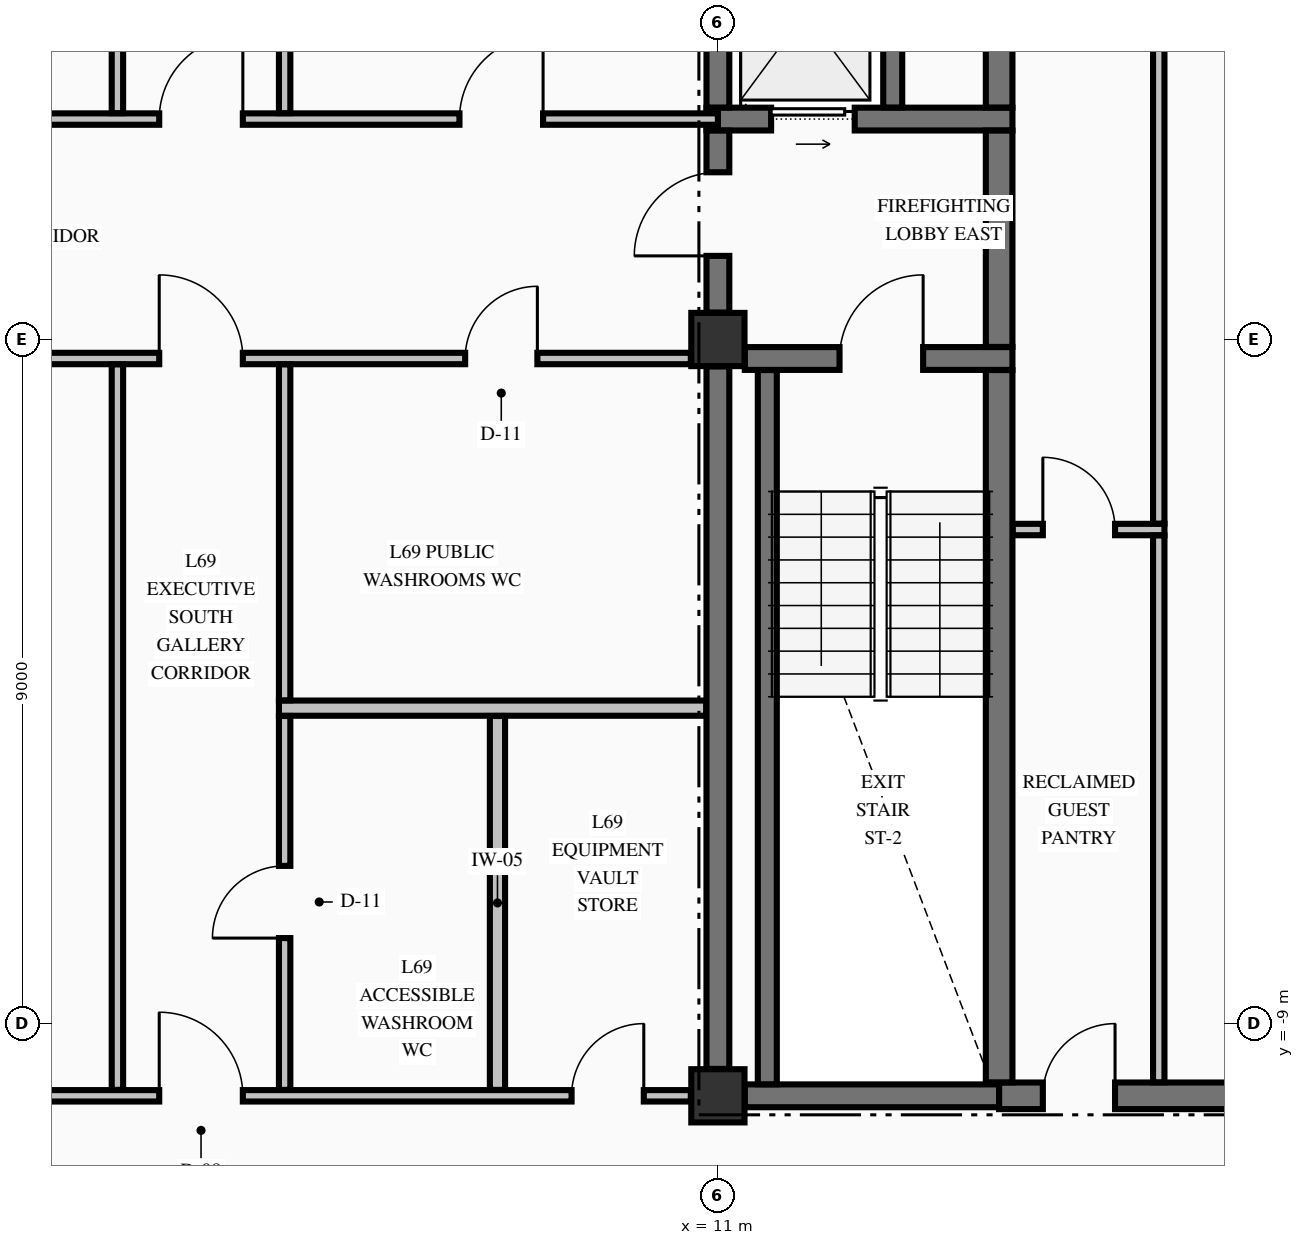
"""IFC4 building model, lengths in metres.
Left out: names, types, materials, properties, quantities, classifications, styles, units other than length and angle.
Written with IfcOpenShell. Run it as: python <this file> out.ifc"""

import sys

from ifc_helpers import new_model, si_unit, direction, frame, frame_2d, origin, origin_2d, place, context, subcontext, project, spatial, rectangle, extrude, element, fill, save


model = new_model("IFC4")
c1 = context("Model", 3, precision=1e-05, world=origin(), true_north=direction((0.0, 1.0)))
c2 = subcontext(c1, "Body", "Model", "MODEL_VIEW")
j1 = project(units=[si_unit("LENGTHUNIT", "METRE"), si_unit("PLANEANGLEUNIT", "RADIAN")], contexts=[c1])
p1 = place(None, origin())
s1 = spatial("IfcSite", under=j1, at=p1, CompositionType="ELEMENT")
p2 = place(p1, origin())
s2 = spatial("IfcBuilding", under=s1, at=p2, CompositionType="ELEMENT")
p3 = place(p2, frame((0.0, 0.0, 260.89)))
s3 = spatial("IfcBuildingStorey", under=s2, at=p3, CompositionType="ELEMENT", Elevation=260.89)
for number, where, z_axis, x_axis in (
    (1, (11.0, -9.95, -0.25), (0.0, 0.0, 1.0), (1.0, 0.0, 0.0)),
    (2, (11.0, 0.0, -0.25), (0.0, 0.0, 1.0), (1.0, 0.0, 0.0)),
):
    element("IfcColumn", number, at=place(p3, frame(where, z_axis=z_axis, x_axis=x_axis)), inside=s3, PredefinedType="COLUMN", context=c2, shape_type="SweptSolid", body=[
        extrude(rectangle(XDim=0.7, YDim=0.7, at=origin_2d()), origin(), (0.0, 0.0, 1.0), 3.23),
    ])
p4 = place(p3, frame((11.354, -9.95, 0.0), z_axis=(0.0, 0.0, 1.0), x_axis=(1.0, 0.0, 0.0)))
e3 = element("IfcWall", 3, at=p4, inside=s3, PredefinedType="SHEAR", context=c2, shape_type="SweptSolid", body=[
    extrude(rectangle(XDim=3.346, YDim=0.3, at=frame_2d((1.673, 0.0))), origin(), (0.0, 0.0, 1.0), 2.98),
])
p5 = place(p3, frame((14.7, -9.95, 0.0), z_axis=(0.0, 0.0, 1.0), x_axis=(1.0, 0.0, 0.0)))
e4 = element("IfcWall", 4, at=p5, inside=s3, PredefinedType="SHEAR", context=c2, shape_type="SweptSolid", body=[
    extrude(rectangle(XDim=4.946, YDim=0.35, at=frame_2d((2.473, 0.0))), origin(), (0.0, 0.0, 1.0), 2.98),
])
p6 = place(p5, frame((3.25, 0.0, 0.0)))
e5 = element("IfcOpeningElement", 5, at=p6, cuts=e4, PredefinedType="OPENING", context=c2, shape_type="SweptSolid", body=[
    extrude(rectangle(XDim=0.9, YDim=2.15, at=frame_2d((0.45, 1.075))), frame((0.0, 0.185, 0.0), z_axis=(0.0, -1.0, 0.0), x_axis=(1.0, 0.0, 0.0)), (0.0, 0.0, 1.0), 0.37),
])
p7 = place(p5, frame((0.575, 0.0, 0.0)))
e6 = element("IfcOpeningElement", 6, at=p7, cuts=e4, PredefinedType="OPENING", context=c2, shape_type="SweptSolid", body=[
    extrude(rectangle(XDim=0.95, YDim=2.15, at=frame_2d((0.475, 1.075))), frame((0.0, 0.185, 0.0), z_axis=(0.0, -1.0, 0.0), x_axis=(1.0, 0.0, 0.0)), (0.0, 0.0, 1.0), 0.37),
])
p8 = place(p3, frame((11.354, -0.25, 0.0), z_axis=(0.0, 0.0, 1.0), x_axis=(1.0, 0.0, 0.0)))
e7 = element("IfcWall", 7, at=p8, inside=s3, PredefinedType="SHEAR", context=c2, shape_type="SweptSolid", body=[
    extrude(rectangle(XDim=3.521, YDim=0.3, at=frame_2d((1.76, 0.0))), origin(), (0.0, 0.0, 1.0), 2.98),
])
p9 = place(p8, frame((1.246, 0.0, 0.0)))
e8 = element("IfcOpeningElement", 8, at=p9, cuts=e7, PredefinedType="OPENING", context=c2, shape_type="SweptSolid", body=[
    extrude(rectangle(XDim=1.1, YDim=2.15, at=frame_2d((0.55, 1.075))), frame((0.0, 0.16, 0.0), z_axis=(0.0, -1.0, 0.0), x_axis=(1.0, 0.0, 0.0)), (0.0, 0.0, 1.0), 0.32),
])
p10 = place(p3, frame((10.85, 2.9, 0.0), z_axis=(0.0, 0.0, 1.0), x_axis=(1.0, 0.0, 0.0)))
e9 = element("IfcWall", 9, at=p10, inside=s3, PredefinedType="SHEAR", context=c2, shape_type="SweptSolid", body=[
    extrude(rectangle(XDim=4.025, YDim=0.3, at=frame_2d((2.012, 0.0))), origin(), (0.0, 0.0, 1.0), 2.98),
])
p11 = place(p10, frame((0.85, 0.0, 0.0)))
e10 = element("IfcOpeningElement", 10, at=p11, cuts=e9, PredefinedType="OPENING", context=c2, shape_type="SweptSolid", body=[
    extrude(rectangle(XDim=1.1, YDim=2.2, at=frame_2d((0.55, 1.1))), frame((0.0, 0.16, 0.0), z_axis=(0.0, -1.0, 0.0), x_axis=(1.0, 0.0, 0.0)), (0.0, 0.0, 1.0), 0.32),
])
p12 = place(p3, frame((-10.644, -9.95, 0.0), z_axis=(0.0, 0.0, 1.0), x_axis=(1.0, 0.0, 0.0)))
e11 = element("IfcWall", 11, at=p12, inside=s3, PredefinedType="PARTITIONING", context=c2, shape_type="SweptSolid", body=[
    extrude(rectangle(XDim=21.288, YDim=0.15, at=frame_2d((10.644, 0.0))), origin(), (0.0, 0.0, 1.0), 2.98),
])
p13 = place(p12, frame((14.294, 0.0, 0.0)))
e12 = element("IfcOpeningElement", 12, at=p13, cuts=e11, PredefinedType="OPENING", context=c2, shape_type="SweptSolid", body=[
    extrude(rectangle(XDim=1.1, YDim=2.15, at=frame_2d((0.55, 1.075))), frame((0.0, 0.085, 0.0), z_axis=(0.0, -1.0, 0.0), x_axis=(1.0, 0.0, 0.0)), (0.0, 0.0, 1.0), 0.17),
])
p14 = place(p12, frame((19.719, 0.0, 0.0)))
e13 = element("IfcOpeningElement", 13, at=p14, cuts=e11, PredefinedType="OPENING", context=c2, shape_type="SweptSolid", body=[
    extrude(rectangle(XDim=0.95, YDim=2.15, at=frame_2d((0.475, 1.075))), frame((0.0, 0.085, 0.0), z_axis=(0.0, -1.0, 0.0), x_axis=(1.0, 0.0, 0.0)), (0.0, 0.0, 1.0), 0.17),
])
p15 = place(p3, frame((5.225, -4.85, 0.0), z_axis=(0.0, 0.0, 1.0), x_axis=(1.0, 0.0, 0.0)))
e14 = element("IfcWall", 14, at=p15, inside=s3, PredefinedType="PARTITIONING", context=c2, shape_type="SweptSolid", body=[
    extrude(rectangle(XDim=5.622, YDim=0.2, at=frame_2d((2.811, 0.0))), origin(), (0.0, 0.0, 1.0), 2.98),
])
p16 = place(p3, frame((14.878, -2.5, 0.0), z_axis=(0.0, 0.0, 1.0), x_axis=(1.0, 0.0, 0.0)))
e15 = element("IfcWall", 15, at=p16, inside=s3, PredefinedType="PARTITIONING", context=c2, shape_type="SweptSolid", body=[
    extrude(rectangle(XDim=1.997, YDim=0.15, at=frame_2d((0.999, 0.0))), origin(), (0.0, 0.0, 1.0), 2.98),
])
p17 = place(p16, frame((0.397, 0.0, 0.0)))
e16 = element("IfcOpeningElement", 16, at=p17, cuts=e15, PredefinedType="OPENING", context=c2, shape_type="SweptSolid", body=[
    extrude(rectangle(XDim=0.95, YDim=2.15, at=frame_2d((0.475, 1.075))), frame((0.0, 0.085, 0.0), z_axis=(0.0, -1.0, 0.0), x_axis=(1.0, 0.0, 0.0)), (0.0, 0.0, 1.0), 0.17),
])
p18 = place(p3, frame((-10.644, -0.25, 0.0), z_axis=(0.0, 0.0, 1.0), x_axis=(1.0, 0.0, 0.0)))
e17 = element("IfcWall", 17, at=p18, inside=s3, PredefinedType="PARTITIONING", context=c2, shape_type="SweptSolid", body=[
    extrude(rectangle(XDim=21.288, YDim=0.15, at=frame_2d((10.644, 0.0))), origin(), (0.0, 0.0, 1.0), 2.98),
])
p19 = place(p18, frame((14.294, 0.0, 0.0)))
e18 = element("IfcOpeningElement", 18, at=p19, cuts=e17, PredefinedType="OPENING", context=c2, shape_type="SweptSolid", body=[
    extrude(rectangle(XDim=1.1, YDim=2.15, at=frame_2d((0.55, 1.075))), frame((0.0, 0.085, 0.0), z_axis=(0.0, -1.0, 0.0), x_axis=(1.0, 0.0, 0.0)), (0.0, 0.0, 1.0), 0.17),
])
p20 = place(p18, frame((6.169, 0.0, 0.0)))
e19 = element("IfcOpeningElement", 19, at=p20, cuts=e17, PredefinedType="OPENING", context=c2, shape_type="SweptSolid", body=[
    extrude(rectangle(XDim=1.05, YDim=2.15, at=frame_2d((0.525, 1.075))), frame((0.0, 0.085, 0.0), z_axis=(0.0, -1.0, 0.0), x_axis=(1.0, 0.0, 0.0)), (0.0, 0.0, 1.0), 0.17),
])
p21 = place(p18, frame((18.319, 0.0, 0.0)))
e20 = element("IfcOpeningElement", 20, at=p21, cuts=e17, PredefinedType="OPENING", context=c2, shape_type="SweptSolid", body=[
    extrude(rectangle(XDim=0.95, YDim=2.15, at=frame_2d((0.475, 1.075))), frame((0.0, 0.085, 0.0), z_axis=(0.0, -1.0, 0.0), x_axis=(1.0, 0.0, 0.0)), (0.0, 0.0, 1.0), 0.17),
])
p22 = place(p3, frame((-11.0, 2.9, 0.0), z_axis=(0.0, 0.0, 1.0), x_axis=(1.0, 0.0, 0.0)))
e21 = element("IfcWall", 21, at=p22, inside=s3, PredefinedType="PARTITIONING", context=c2, shape_type="SweptSolid", body=[
    extrude(rectangle(XDim=22.0, YDim=0.15, at=frame_2d((11.0, 0.0))), origin(), (0.0, 0.0, 1.0), 2.98),
])
p23 = place(p22, frame((14.65, 0.0, 0.0)))
e22 = element("IfcOpeningElement", 22, at=p23, cuts=e21, PredefinedType="OPENING", context=c2, shape_type="SweptSolid", body=[
    extrude(rectangle(XDim=1.1, YDim=2.15, at=frame_2d((0.55, 1.075))), frame((0.0, 0.085, 0.0), z_axis=(0.0, -1.0, 0.0), x_axis=(1.0, 0.0, 0.0)), (0.0, 0.0, 1.0), 0.17),
])
p24 = place(p22, frame((6.525, 0.0, 0.0)))
e23 = element("IfcOpeningElement", 23, at=p24, cuts=e21, PredefinedType="OPENING", context=c2, shape_type="SweptSolid", body=[
    extrude(rectangle(XDim=1.05, YDim=2.15, at=frame_2d((0.525, 1.075))), frame((0.0, 0.085, 0.0), z_axis=(0.0, -1.0, 0.0), x_axis=(1.0, 0.0, 0.0)), (0.0, 0.0, 1.0), 0.17),
])
p25 = place(p22, frame((18.6, 0.0, 0.0)))
e24 = element("IfcOpeningElement", 24, at=p25, cuts=e21, PredefinedType="OPENING", context=c2, shape_type="SweptSolid", body=[
    extrude(rectangle(XDim=1.1, YDim=2.15, at=frame_2d((0.55, 1.075))), frame((0.0, 0.085, 0.0), z_axis=(0.0, -1.0, 0.0), x_axis=(1.0, 0.0, 0.0)), (0.0, 0.0, 1.0), 0.17),
])
p26 = place(p3, frame((11.0, -9.596, 0.0), z_axis=(0.0, 0.0, 1.0), x_axis=(0.0, 1.0, 0.0)))
e25 = element("IfcWall", 25, at=p26, inside=s3, PredefinedType="SHEAR", context=c2, shape_type="SweptSolid", body=[
    extrude(rectangle(XDim=9.242, YDim=0.3, at=frame_2d((4.621, 0.0))), origin(), (0.0, 0.0, 1.0), 2.98),
])
p27 = place(p3, frame((11.0, 0.354, 0.0), z_axis=(0.0, 0.0, 1.0), x_axis=(0.0, 1.0, 0.0)))
e26 = element("IfcWall", 26, at=p27, inside=s3, PredefinedType="SHEAR", context=c2, shape_type="SweptSolid", body=[
    extrude(rectangle(XDim=2.394, YDim=0.3, at=frame_2d((1.197, 0.0))), origin(), (0.0, 0.0, 1.0), 2.98),
])
p28 = place(p27, frame((0.746, 0.0, 0.0)))
e27 = element("IfcOpeningElement", 27, at=p28, cuts=e26, PredefinedType="OPENING", context=c2, shape_type="SweptSolid", body=[
    extrude(rectangle(XDim=1.1, YDim=2.15, at=frame_2d((0.55, 1.075))), frame((0.0, 0.16, 0.0), z_axis=(0.0, -1.0, 0.0), x_axis=(1.0, 0.0, 0.0)), (0.0, 0.0, 1.0), 0.32),
])
p29 = place(p3, frame((11.0, 3.052, 0.0), z_axis=(0.0, 0.0, 1.0), x_axis=(0.0, 1.0, 0.0)))
e28 = element("IfcWall", 28, at=p29, inside=s3, PredefinedType="SHEAR", context=c2, shape_type="SweptSolid", body=[
    extrude(rectangle(XDim=2.496, YDim=0.3, at=frame_2d((1.248, 0.0))), origin(), (0.0, 0.0, 1.0), 2.98),
])
p30 = place(p3, frame((11.65, -9.798, 0.0), z_axis=(0.0, 0.0, 1.0), x_axis=(0.0, 1.0, 0.0)))
e29 = element("IfcWall", 29, at=p30, inside=s3, PredefinedType="SOLIDWALL", context=c2, shape_type="SweptSolid", body=[
    extrude(rectangle(XDim=9.396, YDim=0.25, at=frame_2d((4.698, 0.0))), origin(), (0.0, 0.0, 1.0), 2.98),
])
p31 = place(p3, frame((13.3, 3.052, 0.0), z_axis=(0.0, 0.0, 1.0), x_axis=(0.0, 1.0, 0.0)))
e30 = element("IfcWall", 30, at=p31, inside=s3, PredefinedType="SOLIDWALL", context=c2, shape_type="SweptSolid", body=[
    extrude(rectangle(XDim=2.496, YDim=0.25, at=frame_2d((1.248, 0.0))), origin(), (0.0, 0.0, 1.0), 2.98),
])
p32 = place(p3, frame((14.7, -9.773, 0.0), z_axis=(0.0, 0.0, 1.0), x_axis=(0.0, 1.0, 0.0)))
e31 = element("IfcWall", 31, at=p32, inside=s3, PredefinedType="SHEAR", context=c2, shape_type="SweptSolid", body=[
    extrude(rectangle(XDim=9.371, YDim=0.35, at=frame_2d((4.686, 0.0))), origin(), (0.0, 0.0, 1.0), 2.98),
])
p33 = place(p3, frame((14.7, -0.098, 0.0), z_axis=(0.0, 0.0, 1.0), x_axis=(0.0, 1.0, 0.0)))
e32 = element("IfcWall", 32, at=p33, inside=s3, PredefinedType="SHEAR", context=c2, shape_type="SweptSolid", body=[
    extrude(rectangle(XDim=2.846, YDim=0.35, at=frame_2d((1.423, 0.0))), origin(), (0.0, 0.0, 1.0), 2.98),
])
p34 = place(p3, frame((14.7, 3.052, 0.0), z_axis=(0.0, 0.0, 1.0), x_axis=(0.0, 1.0, 0.0)))
e33 = element("IfcWall", 33, at=p34, inside=s3, PredefinedType="SHEAR", context=c2, shape_type="SweptSolid", body=[
    extrude(rectangle(XDim=2.496, YDim=0.35, at=frame_2d((1.248, 0.0))), origin(), (0.0, 0.0, 1.0), 2.98),
])
p35 = place(p3, frame((3.1, -9.872, 0.0), z_axis=(0.0, 0.0, 1.0), x_axis=(0.0, 1.0, 0.0)))
e34 = element("IfcWall", 34, at=p35, inside=s3, PredefinedType="PARTITIONING", context=c2, shape_type="SweptSolid", body=[
    extrude(rectangle(XDim=9.544, YDim=0.15, at=frame_2d((4.772, 0.0))), origin(), (0.0, 0.0, 1.0), 2.98),
])
p36 = place(p3, frame((3.1, 2.978, 0.0), z_axis=(0.0, 0.0, 1.0), x_axis=(0.0, 1.0, 0.0)))
e35 = element("IfcWall", 35, at=p36, inside=s3, PredefinedType="PARTITIONING", context=c2, shape_type="SweptSolid", body=[
    extrude(rectangle(XDim=7.444, YDim=0.15, at=frame_2d((3.722, 0.0))), origin(), (0.0, 0.0, 1.0), 2.98),
])
p37 = place(p3, frame((5.3, -9.872, 0.0), z_axis=(0.0, 0.0, 1.0), x_axis=(0.0, 1.0, 0.0)))
e36 = element("IfcWall", 36, at=p37, inside=s3, PredefinedType="PARTITIONING", context=c2, shape_type="SweptSolid", body=[
    extrude(rectangle(XDim=4.919, YDim=0.15, at=frame_2d((2.459, 0.0))), origin(), (0.0, 0.0, 1.0), 2.98),
])
p38 = place(p37, frame((1.997, 0.0, 0.0)))
e37 = element("IfcOpeningElement", 37, at=p38, cuts=e36, PredefinedType="OPENING", context=c2, shape_type="SweptSolid", body=[
    extrude(rectangle(XDim=0.95, YDim=2.15, at=frame_2d((0.475, 1.075))), frame((0.0, 0.085, 0.0), z_axis=(0.0, -1.0, 0.0), x_axis=(1.0, 0.0, 0.0)), (0.0, 0.0, 1.0), 0.17),
])
p39 = place(p3, frame((5.3, -4.747, 0.0), z_axis=(0.0, 0.0, 1.0), x_axis=(0.0, 1.0, 0.0)))
e38 = element("IfcWall", 38, at=p39, inside=s3, PredefinedType="PARTITIONING", context=c2, shape_type="SweptSolid", body=[
    extrude(rectangle(XDim=4.419, YDim=0.15, at=frame_2d((2.209, 0.0))), origin(), (0.0, 0.0, 1.0), 2.98),
])
p40 = place(p3, frame((5.3, 2.978, 0.0), z_axis=(0.0, 0.0, 1.0), x_axis=(0.0, 1.0, 0.0)))
e39 = element("IfcWall", 39, at=p40, inside=s3, PredefinedType="PARTITIONING", context=c2, shape_type="SweptSolid", body=[
    extrude(rectangle(XDim=7.444, YDim=0.15, at=frame_2d((3.722, 0.0))), origin(), (0.0, 0.0, 1.0), 2.98),
])
p41 = place(p3, frame((8.1, -9.872, 0.0), z_axis=(0.0, 0.0, 1.0), x_axis=(0.0, 1.0, 0.0)))
e40 = element("IfcWall", 40, at=p41, inside=s3, PredefinedType="PARTITIONING", context=c2, shape_type="SweptSolid", body=[
    extrude(rectangle(XDim=4.919, YDim=0.2, at=frame_2d((2.459, 0.0))), origin(), (0.0, 0.0, 1.0), 2.98),
])
p42 = place(p3, frame((16.8, -9.772, 0.0), z_axis=(0.0, 0.0, 1.0), x_axis=(0.0, 1.0, 0.0)))
e41 = element("IfcWall", 41, at=p42, inside=s3, PredefinedType="PARTITIONING", context=c2, shape_type="SweptSolid", body=[
    extrude(rectangle(XDim=7.194, YDim=0.15, at=frame_2d((3.597, 0.0))), origin(), (0.0, 0.0, 1.0), 2.98),
])
p43 = place(p3, frame((16.8, -2.422, 0.0), z_axis=(0.0, 0.0, 1.0), x_axis=(0.0, 1.0, 0.0)))
e42 = element("IfcWall", 42, at=p43, inside=s3, PredefinedType="PARTITIONING", context=c2, shape_type="SweptSolid", body=[
    extrude(rectangle(XDim=7.144, YDim=0.15, at=frame_2d((3.572, 0.0))), origin(), (0.0, 0.0, 1.0), 2.98),
])
p44 = place(p9, origin())
e43 = element("IfcDoor", 43, at=p44, inside=s3, OperationType="SINGLE_SWING_RIGHT", PredefinedType="DOOR", context=c2, shape_type="SweptSolid", body=[
    extrude(rectangle(XDim=1.1, YDim=2.15, at=frame_2d((0.55, 1.075))), frame((0.0, 0.025, 0.0), z_axis=(0.0, -1.0, 0.0), x_axis=(1.0, 0.0, 0.0)), (0.0, 0.0, 1.0), 0.05),
])
fill(e8, e43)
p45 = place(p28, origin())
e44 = element("IfcDoor", 44, at=p45, inside=s3, OperationType="SINGLE_SWING_LEFT", PredefinedType="DOOR", context=c2, shape_type="SweptSolid", body=[
    extrude(rectangle(XDim=1.1, YDim=2.15, at=frame_2d((0.55, 1.075))), frame((0.0, 0.025, 0.0), z_axis=(0.0, -1.0, 0.0), x_axis=(1.0, 0.0, 0.0)), (0.0, 0.0, 1.0), 0.05),
])
fill(e27, e44)
p46 = place(p11, origin())
e45 = element("IfcDoor", 45, at=p46, inside=s3, OperationType="SLIDING_TO_RIGHT", PredefinedType="DOOR", context=c2, shape_type="SweptSolid", body=[
    extrude(rectangle(XDim=1.1, YDim=2.2, at=frame_2d((0.55, 1.1))), frame((0.0, 0.025, 0.0), z_axis=(0.0, -1.0, 0.0), x_axis=(1.0, 0.0, 0.0)), (0.0, 0.0, 1.0), 0.05),
])
fill(e10, e45)
p47 = place(p7, origin())
e46 = element("IfcDoor", 46, at=p47, inside=s3, OperationType="SINGLE_SWING_RIGHT", PredefinedType="DOOR", context=c2, shape_type="SweptSolid", body=[
    extrude(rectangle(XDim=0.95, YDim=2.15, at=frame_2d((0.475, 1.075))), frame((0.0, 0.025, 0.0), z_axis=(0.0, -1.0, 0.0), x_axis=(1.0, 0.0, 0.0)), (0.0, 0.0, 1.0), 0.05),
])
fill(e6, e46)
p48 = place(p17, origin())
e47 = element("IfcDoor", 47, at=p48, inside=s3, OperationType="SINGLE_SWING_LEFT", PredefinedType="DOOR", context=c2, shape_type="SweptSolid", body=[
    extrude(rectangle(XDim=0.95, YDim=2.15, at=frame_2d((0.475, 1.075))), frame((0.0, 0.025, 0.0), z_axis=(0.0, -1.0, 0.0), x_axis=(1.0, 0.0, 0.0)), (0.0, 0.0, 1.0), 0.05),
])
fill(e16, e47)
p49 = place(p13, origin())
e48 = element("IfcDoor", 48, at=p49, inside=s3, OperationType="SINGLE_SWING_LEFT", PredefinedType="DOOR", context=c2, shape_type="SweptSolid", body=[
    extrude(rectangle(XDim=1.1, YDim=2.15, at=frame_2d((0.55, 1.075))), frame((0.0, 0.025, 0.0), z_axis=(0.0, -1.0, 0.0), x_axis=(1.0, 0.0, 0.0)), (0.0, 0.0, 1.0), 0.05),
])
fill(e12, e48)
p50 = place(p23, origin())
e49 = element("IfcDoor", 49, at=p50, inside=s3, OperationType="SINGLE_SWING_RIGHT", PredefinedType="DOOR", context=c2, shape_type="SweptSolid", body=[
    extrude(rectangle(XDim=1.1, YDim=2.15, at=frame_2d((0.55, 1.075))), frame((0.0, 0.025, 0.0), z_axis=(0.0, -1.0, 0.0), x_axis=(1.0, 0.0, 0.0)), (0.0, 0.0, 1.0), 0.05),
])
fill(e22, e49)
p51 = place(p19, origin())
e50 = element("IfcDoor", 50, at=p51, inside=s3, OperationType="SINGLE_SWING_LEFT", PredefinedType="DOOR", context=c2, shape_type="SweptSolid", body=[
    extrude(rectangle(XDim=1.1, YDim=2.15, at=frame_2d((0.55, 1.075))), frame((0.0, 0.025, 0.0), z_axis=(0.0, -1.0, 0.0), x_axis=(1.0, 0.0, 0.0)), (0.0, 0.0, 1.0), 0.05),
])
fill(e18, e50)
p52 = place(p25, origin())
e51 = element("IfcDoor", 51, at=p52, inside=s3, OperationType="SINGLE_SWING_RIGHT", PredefinedType="DOOR", context=c2, shape_type="SweptSolid", body=[
    extrude(rectangle(XDim=1.1, YDim=2.15, at=frame_2d((0.55, 1.075))), frame((0.0, 0.025, 0.0), z_axis=(0.0, -1.0, 0.0), x_axis=(1.0, 0.0, 0.0)), (0.0, 0.0, 1.0), 0.05),
])
fill(e24, e51)
p53 = place(p21, origin())
e52 = element("IfcDoor", 52, at=p53, inside=s3, OperationType="SINGLE_SWING_RIGHT", PredefinedType="DOOR", context=c2, shape_type="SweptSolid", body=[
    extrude(rectangle(XDim=0.95, YDim=2.15, at=frame_2d((0.475, 1.075))), frame((0.0, 0.025, 0.0), z_axis=(0.0, -1.0, 0.0), x_axis=(1.0, 0.0, 0.0)), (0.0, 0.0, 1.0), 0.05),
])
fill(e20, e52)
p54 = place(p38, origin())
e53 = element("IfcDoor", 53, at=p54, inside=s3, OperationType="SINGLE_SWING_LEFT", PredefinedType="DOOR", context=c2, shape_type="SweptSolid", body=[
    extrude(rectangle(XDim=0.95, YDim=2.15, at=frame_2d((0.475, 1.075))), frame((0.0, 0.025, 0.0), z_axis=(0.0, -1.0, 0.0), x_axis=(1.0, 0.0, 0.0)), (0.0, 0.0, 1.0), 0.05),
])
fill(e37, e53)
p55 = place(p14, origin())
e54 = element("IfcDoor", 54, at=p55, inside=s3, OperationType="SINGLE_SWING_RIGHT", PredefinedType="DOOR", context=c2, shape_type="SweptSolid", body=[
    extrude(rectangle(XDim=0.95, YDim=2.15, at=frame_2d((0.475, 1.075))), frame((0.0, 0.025, 0.0), z_axis=(0.0, -1.0, 0.0), x_axis=(1.0, 0.0, 0.0)), (0.0, 0.0, 1.0), 0.05),
])
fill(e13, e54)
save(model, sys.argv[1])
